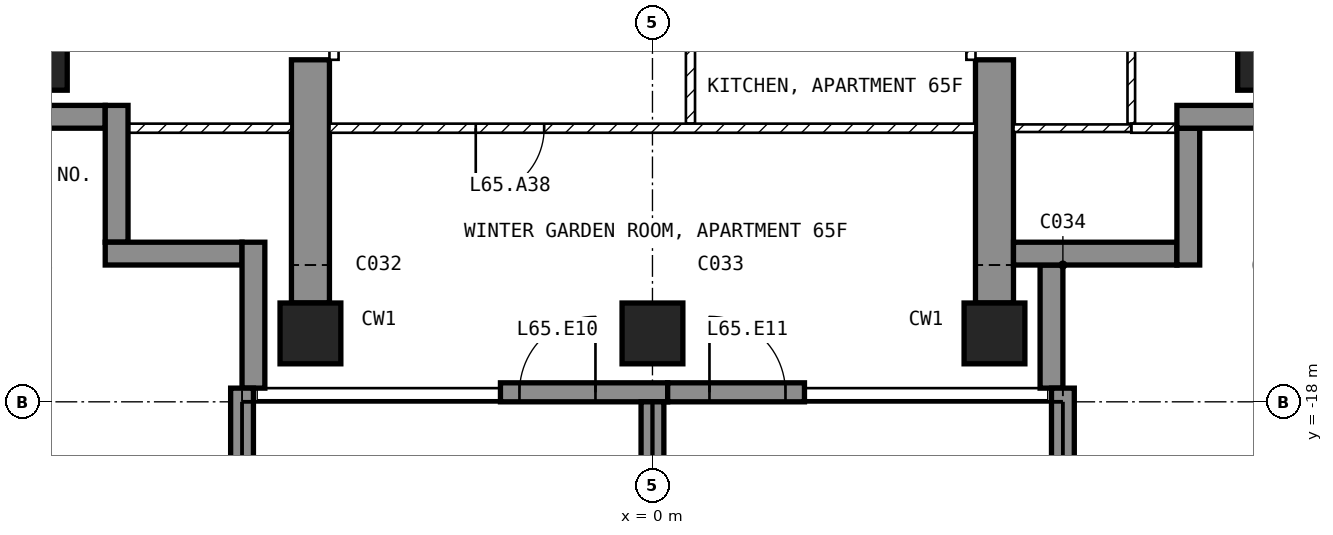
"""IFC4 building model, lengths in metres.
Left out: names, types, materials, properties, quantities, classifications, styles, units other than length and angle.
Written with IfcOpenShell. Run it as: python <this file> out.ifc"""

import sys

from ifc_helpers import new_model, si_unit, direction, frame, frame_2d, origin, origin_2d, place, context, subcontext, project, spatial, polyline, rectangle, outline, extrude, element, fill, save


model = new_model("IFC4")
c1 = context("Model", 3, precision=1e-05, world=origin(), true_north=direction((0.0, 1.0)))
c2 = subcontext(c1, "Body", "Model", "MODEL_VIEW")
j1 = project(units=[si_unit("LENGTHUNIT", "METRE"), si_unit("PLANEANGLEUNIT", "RADIAN")], contexts=[c1])
p1 = place(None, origin())
s1 = spatial("IfcSite", under=j1, at=p1, CompositionType="ELEMENT")
p2 = place(p1, origin())
s2 = spatial("IfcBuilding", under=s1, at=p2, CompositionType="ELEMENT")
p3 = place(p2, frame((0.0, 0.0, 257.0)))
s3 = spatial("IfcBuildingStorey", under=s2, at=p3, CompositionType="ELEMENT", Elevation=257.0)
for number, where, z_axis, x_axis in (
    (1, (-8.1, -13.5, -0.25), (0.0, 0.0, 1.0), (1.0, 0.0, 0.0)),
    (2, (-4.5, -17.1, -0.25), (0.0, 0.0, 1.0), (1.0, 0.0, 0.0)),
    (3, (0.0, -17.1, -0.25), (0.0, 0.0, 1.0), (1.0, 0.0, 0.0)),
    (4, (4.5, -17.1, -0.25), (0.0, 0.0, 1.0), (1.0, 0.0, 0.0)),
    (5, (8.1, -13.5, -0.25), (0.0, 0.0, 1.0), (1.0, 0.0, 0.0)),
):
    element("IfcColumn", number, at=place(p3, frame(where, z_axis=z_axis, x_axis=x_axis)), inside=s3, PredefinedType="COLUMN", context=c2, shape_type="SweptSolid", body=[
        extrude(rectangle(XDim=0.8, YDim=0.8, at=origin_2d()), origin(), (0.0, 0.0, 1.0), 3.5),
    ])
for number, where, z_axis, x_axis in (
    (6, (-4.75, -16.7, -0.25), (1.0, 0.0, 0.0), (0.0, 1.0, 0.0)),
    (7, (4.25, -16.7, -0.25), (1.0, 0.0, 0.0), (0.0, 1.0, 0.0)),
):
    element("IfcWall", number, at=place(p3, frame(where, z_axis=z_axis, x_axis=x_axis)), inside=s3, PredefinedType="SHEAR", context=c2, shape_type="SweptSolid", body=[
        extrude(outline(polyline([(0.0, 0.0), (3.2, 0.0), (3.2, 2.65), (5.6, 2.65), (5.6, 0.0), (7.7, 0.0), (7.7, 3.5), (0.0, 3.5), (0.0, 0.0)])), origin(), (0.0, 0.0, 1.0), 0.5),
    ])
p4 = place(p3, frame((-2.0, -17.875, 0.0), z_axis=(0.0, 0.0, 1.0), x_axis=(1.0, 0.0, 0.0)))
e8 = element("IfcWall", 8, at=p4, inside=s3, PredefinedType="SOLIDWALL", context=c2, shape_type="SweptSolid", body=[
    extrude(rectangle(XDim=2.2, YDim=0.25, at=frame_2d((1.1, 0.0))), origin(), (0.0, 0.0, 1.0), 3.25),
])
p5 = place(p4, frame((0.25, 0.0, 0.0)))
e9 = element("IfcOpeningElement", 9, at=p5, cuts=e8, PredefinedType="OPENING", context=c2, shape_type="SweptSolid", body=[
    extrude(rectangle(XDim=1.0, YDim=2.4, at=frame_2d((0.5, 1.2))), frame((0.0, 0.135, 0.0), z_axis=(0.0, -1.0, 0.0), x_axis=(1.0, 0.0, 0.0)), (0.0, 0.0, 1.0), 0.27),
])
p6 = place(p3, frame((0.2, -17.875, 0.0), z_axis=(0.0, 0.0, 1.0), x_axis=(1.0, 0.0, 0.0)))
e10 = element("IfcWall", 10, at=p6, inside=s3, PredefinedType="SOLIDWALL", context=c2, shape_type="SweptSolid", body=[
    extrude(rectangle(XDim=1.8, YDim=0.25, at=frame_2d((0.9, 0.0))), origin(), (0.0, 0.0, 1.0), 3.25),
])
p7 = place(p6, frame((0.55, 0.0, 0.0)))
e11 = element("IfcOpeningElement", 11, at=p7, cuts=e10, PredefinedType="OPENING", context=c2, shape_type="SweptSolid", body=[
    extrude(rectangle(XDim=1.0, YDim=2.4, at=frame_2d((0.5, 1.2))), frame((0.0, 0.135, 0.0), z_axis=(0.0, -1.0, 0.0), x_axis=(1.0, 0.0, 0.0)), (0.0, 0.0, 1.0), 0.27),
])
p8 = place(p3, frame((5.25, -17.82, 0.0), z_axis=(0.0, 0.0, 1.0), x_axis=(0.0, 1.0, 0.0)))
e12 = element("IfcWall", 12, at=p8, inside=s3, PredefinedType="SOLIDWALL", context=c2, shape_type="SweptSolid", body=[
    extrude(rectangle(XDim=1.62, YDim=0.3, at=frame_2d((0.81, 0.0))), origin(), (0.0, 0.0, 1.0), 3.25),
])
p9 = place(p3, frame((4.75, -16.05, 0.0), z_axis=(0.0, 0.0, 1.0), x_axis=(1.0, 0.0, 0.0)))
e13 = element("IfcWall", 13, at=p9, inside=s3, PredefinedType="SOLIDWALL", context=c2, shape_type="SweptSolid", body=[
    extrude(rectangle(XDim=2.15, YDim=0.3, at=frame_2d((1.075, 0.0))), origin(), (0.0, 0.0, 1.0), 3.25),
])
p10 = place(p3, frame((7.05, -16.2, 0.0), z_axis=(0.0, 0.0, 1.0), x_axis=(0.0, 1.0, 0.0)))
e14 = element("IfcWall", 14, at=p10, inside=s3, PredefinedType="SOLIDWALL", context=c2, shape_type="SweptSolid", body=[
    extrude(rectangle(XDim=1.8, YDim=0.3, at=frame_2d((0.9, 0.0))), origin(), (0.0, 0.0, 1.0), 3.25),
])
p11 = place(p3, frame((6.9, -14.25, 0.0), z_axis=(0.0, 0.0, 1.0), x_axis=(1.0, 0.0, 0.0)))
e15 = element("IfcWall", 15, at=p11, inside=s3, PredefinedType="SOLIDWALL", context=c2, shape_type="SweptSolid", body=[
    extrude(rectangle(XDim=1.85, YDim=0.3, at=frame_2d((0.925, 0.0))), origin(), (0.0, 0.0, 1.0), 3.25),
])
p12 = place(p3, frame((-8.75, -14.25, 0.0), z_axis=(0.0, 0.0, 1.0), x_axis=(1.0, 0.0, 0.0)))
e16 = element("IfcWall", 16, at=p12, inside=s3, PredefinedType="SOLIDWALL", context=c2, shape_type="SweptSolid", body=[
    extrude(rectangle(XDim=1.55, YDim=0.3, at=frame_2d((0.775, 0.0))), origin(), (0.0, 0.0, 1.0), 3.25),
])
p13 = place(p3, frame((-7.05, -14.1, 0.0), z_axis=(0.0, 0.0, 1.0), x_axis=(0.0, -1.0, 0.0)))
e17 = element("IfcWall", 17, at=p13, inside=s3, PredefinedType="SOLIDWALL", context=c2, shape_type="SweptSolid", body=[
    extrude(rectangle(XDim=1.8, YDim=0.3, at=frame_2d((0.9, 0.0))), origin(), (0.0, 0.0, 1.0), 3.25),
])
p14 = place(p3, frame((-7.2, -16.05, 0.0), z_axis=(0.0, 0.0, 1.0), x_axis=(1.0, 0.0, 0.0)))
e18 = element("IfcWall", 18, at=p14, inside=s3, PredefinedType="SOLIDWALL", context=c2, shape_type="SweptSolid", body=[
    extrude(rectangle(XDim=1.8, YDim=0.3, at=frame_2d((0.9, 0.0))), origin(), (0.0, 0.0, 1.0), 3.25),
])
p15 = place(p3, frame((-5.25, -15.9, 0.0), z_axis=(0.0, 0.0, 1.0), x_axis=(0.0, -1.0, 0.0)))
e19 = element("IfcWall", 19, at=p15, inside=s3, PredefinedType="SOLIDWALL", context=c2, shape_type="SweptSolid", body=[
    extrude(rectangle(XDim=1.92, YDim=0.3, at=frame_2d((0.96, 0.0))), origin(), (0.0, 0.0, 1.0), 3.25),
])
p16 = place(p3, frame((-5.4, -17.82, 0.0), z_axis=(0.0, 0.0, 1.0), x_axis=(0.0, -1.0, 0.0)))
e20 = element("IfcWall", 20, at=p16, inside=s3, PredefinedType="SOLIDWALL", context=c2, shape_type="SweptSolid", body=[
    extrude(rectangle(XDim=2.88, YDim=0.3, at=frame_2d((1.44, 0.0))), origin(), (0.0, 0.0, 1.0), 3.25),
])
p17 = place(p3, frame((0.0, -18.0, 0.0), z_axis=(0.0, 0.0, 1.0), x_axis=(0.0, -1.0, 0.0)))
e21 = element("IfcWall", 21, at=p17, inside=s3, PredefinedType="SOLIDWALL", context=c2, shape_type="SweptSolid", body=[
    extrude(rectangle(XDim=2.7, YDim=0.3, at=frame_2d((1.35, 0.0))), origin(), (0.0, 0.0, 1.0), 3.25),
])
p18 = place(p3, frame((5.4, -17.82, 0.0), z_axis=(0.0, 0.0, 1.0), x_axis=(0.0, -1.0, 0.0)))
e22 = element("IfcWall", 22, at=p18, inside=s3, PredefinedType="SOLIDWALL", context=c2, shape_type="SweptSolid", body=[
    extrude(rectangle(XDim=2.88, YDim=0.3, at=frame_2d((1.44, 0.0))), origin(), (0.0, 0.0, 1.0), 3.25),
])
p19 = place(p3, frame((0.5, -11.46, 0.0), z_axis=(0.0, 0.0, 1.0), x_axis=(0.0, -1.0, 0.0)))
e23 = element("IfcWall", 23, at=p19, inside=s3, PredefinedType="PARTITIONING", context=c2, shape_type="SweptSolid", body=[
    extrude(rectangle(XDim=2.88, YDim=0.12, at=frame_2d((1.44, 0.0))), origin(), (0.0, 0.0, 1.0), 3.25),
])
p20 = place(p19, frame((0.99, 0.0, 0.0)))
e24 = element("IfcOpeningElement", 24, at=p20, cuts=e23, PredefinedType="OPENING", context=c2, shape_type="SweptSolid", body=[
    extrude(rectangle(XDim=0.9, YDim=2.1, at=frame_2d((0.45, 1.05))), frame((0.0, 0.07, 0.0), z_axis=(0.0, -1.0, 0.0), x_axis=(1.0, 0.0, 0.0)), (0.0, 0.0, 1.0), 0.14),
])
p21 = place(p3, frame((4.25, -14.4, 0.0), z_axis=(0.0, 0.0, 1.0), x_axis=(-1.0, 0.0, 0.0)))
e25 = element("IfcWall", 25, at=p21, inside=s3, PredefinedType="PARTITIONING", context=c2, shape_type="SweptSolid", body=[
    extrude(rectangle(XDim=8.5, YDim=0.12, at=frame_2d((4.25, 0.0))), origin(), (0.0, 0.0, 1.0), 3.25),
])
p22 = place(p21, frame((5.675, 0.0, 0.0)))
e26 = element("IfcOpeningElement", 26, at=p22, cuts=e25, PredefinedType="OPENING", context=c2, shape_type="SweptSolid", body=[
    extrude(rectangle(XDim=0.9, YDim=2.1, at=frame_2d((0.45, 1.05))), frame((0.0, 0.07, 0.0), z_axis=(0.0, -1.0, 0.0), x_axis=(1.0, 0.0, 0.0)), (0.0, 0.0, 1.0), 0.14),
])
p23 = place(p3, frame((6.3, -14.34, 0.0), z_axis=(0.0, 0.0, 1.0), x_axis=(0.0, 1.0, 0.0)))
e27 = element("IfcWall", 27, at=p23, inside=s3, PredefinedType="PARTITIONING", context=c2, shape_type="SweptSolid", body=[
    extrude(rectangle(XDim=2.89, YDim=0.1, at=frame_2d((1.445, 0.0))), origin(), (0.0, 0.0, 1.0), 3.25),
])
p24 = place(p23, frame((1.02, 0.0, 0.0)))
e28 = element("IfcOpeningElement", 28, at=p24, cuts=e27, PredefinedType="OPENING", context=c2, shape_type="SweptSolid", body=[
    extrude(rectangle(XDim=0.85, YDim=2.1, at=frame_2d((0.425, 1.05))), frame((0.0, 0.06, 0.0), z_axis=(0.0, -1.0, 0.0), x_axis=(1.0, 0.0, 0.0)), (0.0, 0.0, 1.0), 0.12),
])
p25 = place(p3, frame((7.12, -14.4, 0.0), z_axis=(0.0, 0.0, 1.0), x_axis=(-1.0, 0.0, 0.0)))
e29 = element("IfcWall", 29, at=p25, inside=s3, PredefinedType="PARTITIONING", context=c2, shape_type="SweptSolid", body=[
    extrude(rectangle(XDim=0.82, YDim=0.12, at=frame_2d((0.41, 0.0))), origin(), (0.0, 0.0, 1.0), 3.25),
])
p26 = place(p3, frame((6.3, -14.4, 0.0), z_axis=(0.0, 0.0, 1.0), x_axis=(-1.0, 0.0, 0.0)))
e30 = element("IfcWall", 30, at=p26, inside=s3, PredefinedType="PARTITIONING", context=c2, shape_type="SweptSolid", body=[
    extrude(rectangle(XDim=1.55, YDim=0.1, at=frame_2d((0.775, 0.0))), origin(), (0.0, 0.0, 1.0), 3.25),
])
p27 = place(p3, frame((-4.75, -14.4, 0.0), z_axis=(0.0, 0.0, 1.0), x_axis=(-1.0, 0.0, 0.0)))
e31 = element("IfcWall", 31, at=p27, inside=s3, PredefinedType="PARTITIONING", context=c2, shape_type="SweptSolid", body=[
    extrude(rectangle(XDim=2.37, YDim=0.12, at=frame_2d((1.185, 0.0))), origin(), (0.0, 0.0, 1.0), 3.25),
])
p28 = place(p3, frame((4.19, -11.1, 0.0), z_axis=(0.0, 0.0, 1.0), x_axis=(0.0, -1.0, 0.0)))
e32 = element("IfcWall", 32, at=p28, inside=s3, PredefinedType="PARTITIONING", context=c2, shape_type="SweptSolid", body=[
    extrude(rectangle(XDim=2.4, YDim=0.12, at=frame_2d((1.2, 0.0))), origin(), (0.0, 0.0, 1.0), 2.4),
])
p29 = place(p28, frame((0.75, 0.0, 0.0)))
e33 = element("IfcOpeningElement", 33, at=p29, cuts=e32, PredefinedType="OPENING", context=c2, shape_type="SweptSolid", body=[
    extrude(rectangle(XDim=0.9, YDim=2.1, at=frame_2d((0.45, 1.05))), frame((0.0, 0.07, 0.0), z_axis=(0.0, -1.0, 0.0), x_axis=(1.0, 0.0, 0.0)), (0.0, 0.0, 1.0), 0.14),
])
p30 = place(p3, frame((-4.19, -11.1, 0.0), z_axis=(0.0, 0.0, 1.0), x_axis=(0.0, -1.0, 0.0)))
e34 = element("IfcWall", 34, at=p30, inside=s3, PredefinedType="PARTITIONING", context=c2, shape_type="SweptSolid", body=[
    extrude(rectangle(XDim=2.4, YDim=0.12, at=frame_2d((1.2, 0.0))), origin(), (0.0, 0.0, 1.0), 2.4),
])
p31 = place(p30, frame((0.75, 0.0, 0.0)))
e35 = element("IfcOpeningElement", 35, at=p31, cuts=e34, PredefinedType="OPENING", context=c2, shape_type="SweptSolid", body=[
    extrude(rectangle(XDim=0.9, YDim=2.1, at=frame_2d((0.45, 1.05))), frame((0.0, 0.07, 0.0), z_axis=(0.0, -1.0, 0.0), x_axis=(1.0, 0.0, 0.0)), (0.0, 0.0, 1.0), 0.14),
])
p32 = place(p5, origin())
e36 = element("IfcDoor", 36, at=p32, inside=s3, OperationType="SINGLE_SWING_RIGHT", PredefinedType="DOOR", context=c2, shape_type="SweptSolid", body=[
    extrude(rectangle(XDim=1.0, YDim=2.4, at=frame_2d((0.5, 1.2))), frame((0.0, 0.025, 0.0), z_axis=(0.0, -1.0, 0.0), x_axis=(1.0, 0.0, 0.0)), (0.0, 0.0, 1.0), 0.05),
])
fill(e9, e36)
p33 = place(p7, origin())
e37 = element("IfcDoor", 37, at=p33, inside=s3, OperationType="SINGLE_SWING_LEFT", PredefinedType="DOOR", context=c2, shape_type="SweptSolid", body=[
    extrude(rectangle(XDim=1.0, YDim=2.4, at=frame_2d((0.5, 1.2))), frame((0.0, 0.025, 0.0), z_axis=(0.0, -1.0, 0.0), x_axis=(1.0, 0.0, 0.0)), (0.0, 0.0, 1.0), 0.05),
])
fill(e11, e37)
p34 = place(p22, origin())
e38 = element("IfcDoor", 38, at=p34, inside=s3, OperationType="SINGLE_SWING_RIGHT", PredefinedType="DOOR", context=c2, shape_type="SweptSolid", body=[
    extrude(rectangle(XDim=0.9, YDim=2.1, at=frame_2d((0.45, 1.05))), frame((0.0, 0.025, 0.0), z_axis=(0.0, -1.0, 0.0), x_axis=(1.0, 0.0, 0.0)), (0.0, 0.0, 1.0), 0.05),
])
fill(e26, e38)
save(model, sys.argv[1])
